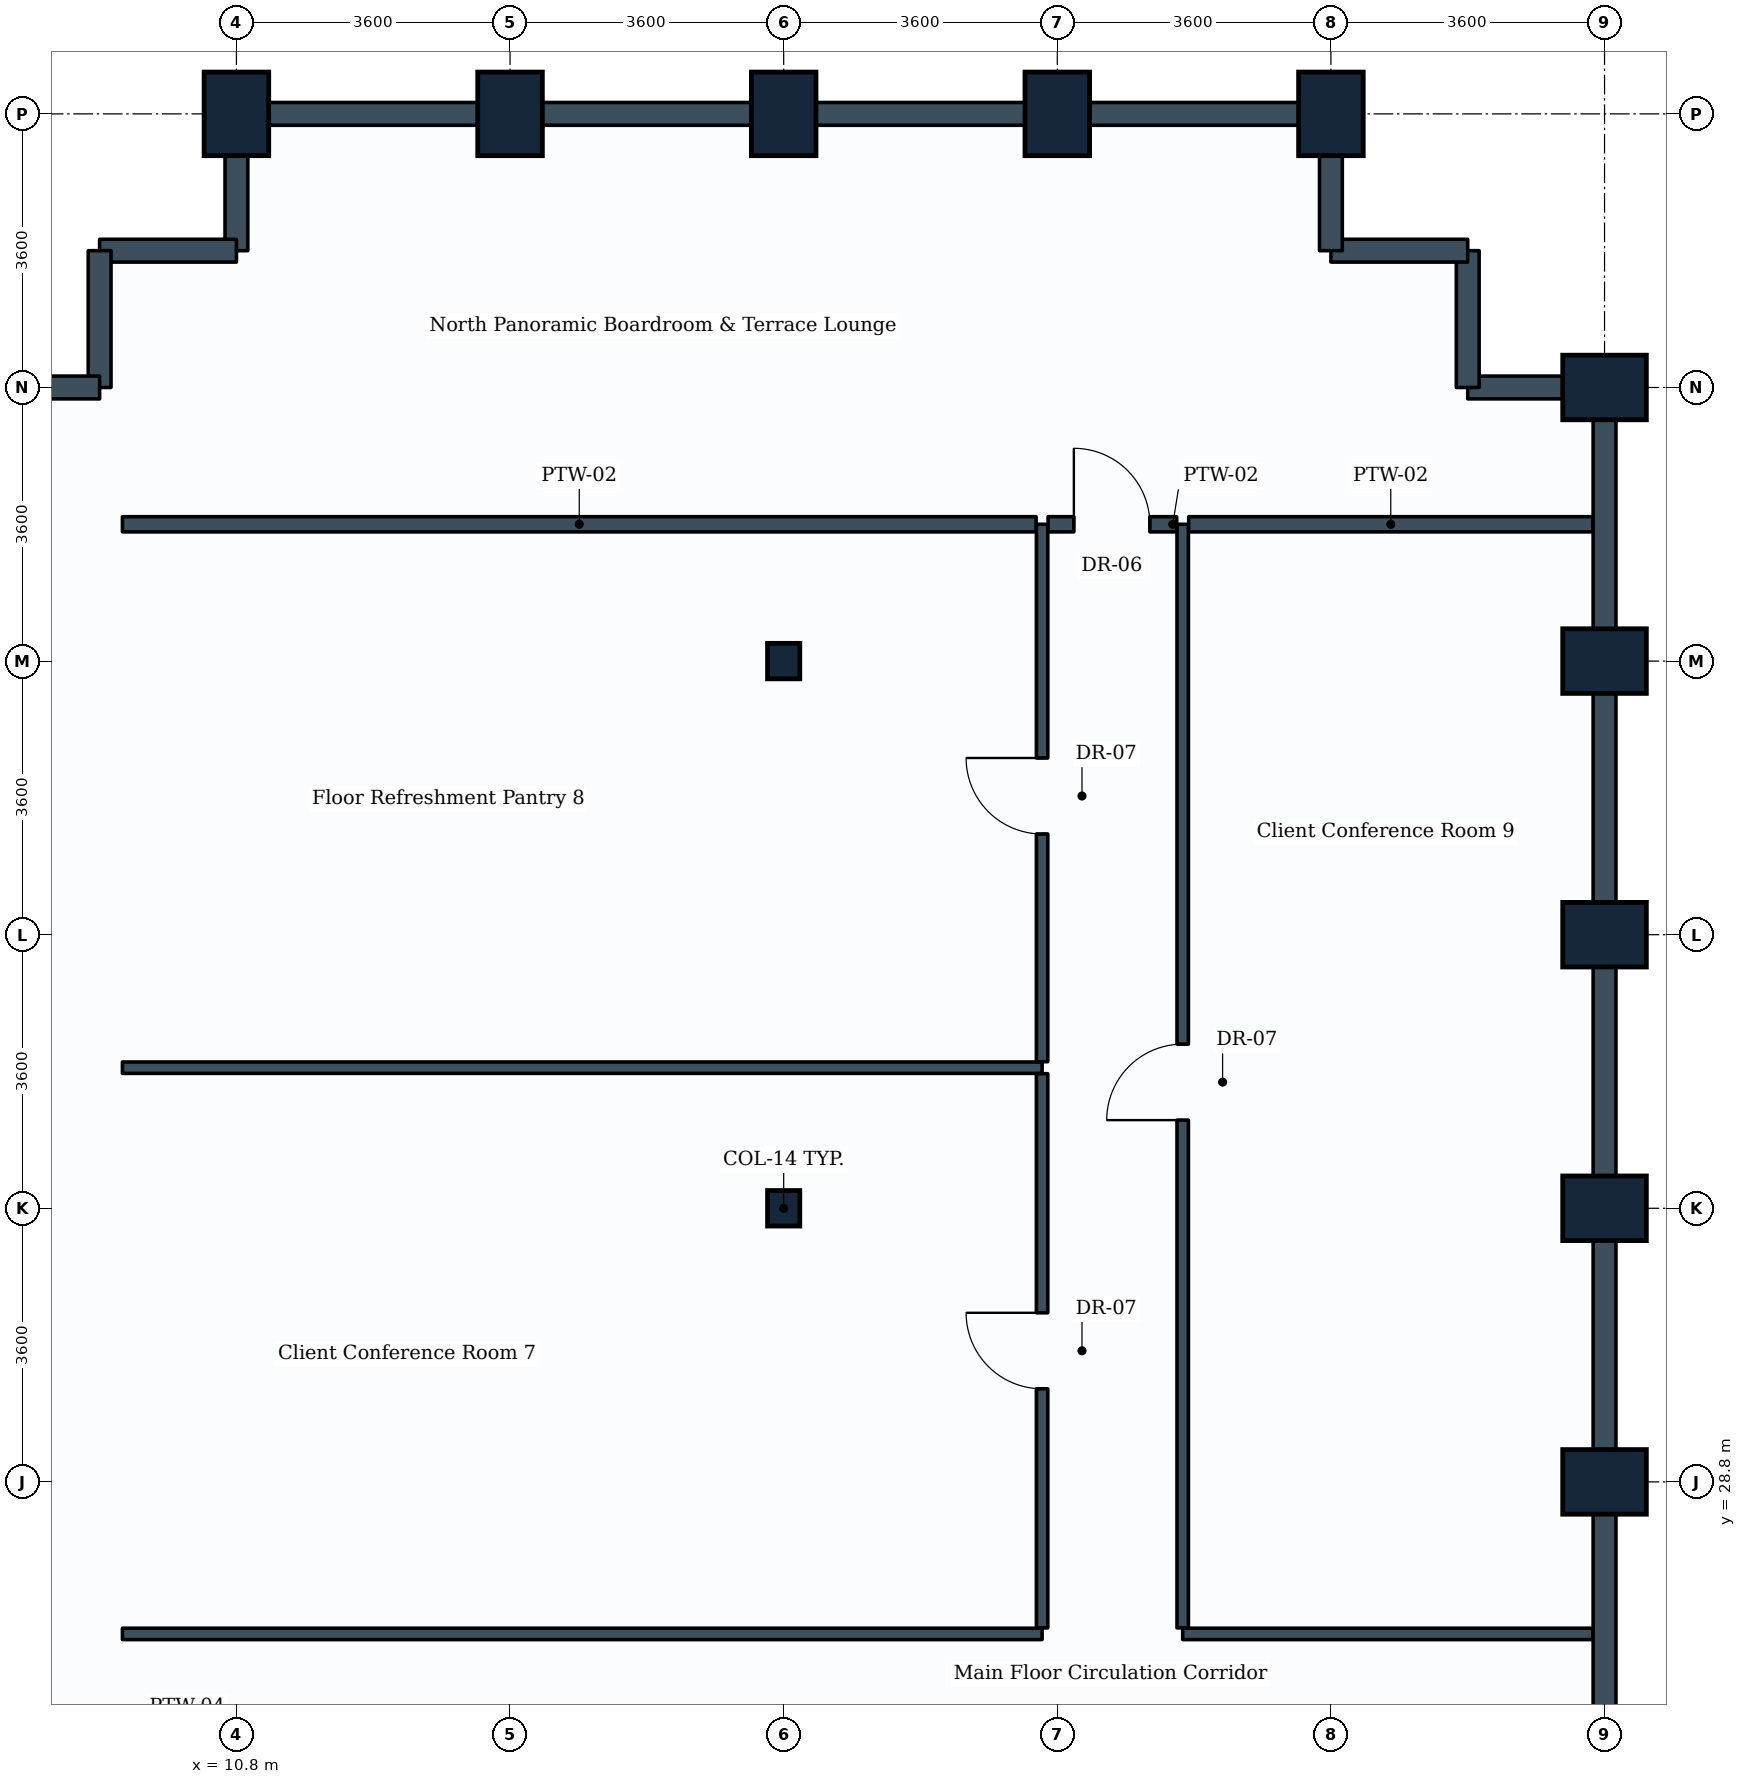
"""IFC4 building model, lengths in metres.
Left out: names, types, materials, properties, quantities, classifications, styles, units other than length and angle.
Written with IfcOpenShell. Run it as: python <this file> out.ifc"""

import sys

from ifc_helpers import new_model, si_unit, direction, frame, frame_2d, origin, origin_2d, place, context, subcontext, project, spatial, rectangle, i_section, extrude, element, fill, save


model = new_model("IFC4")
c1 = context("Model", 3, precision=1e-05, world=origin(), true_north=direction((0.0, 1.0)))
c2 = subcontext(c1, "Body", "Model", "MODEL_VIEW")
j1 = project(units=[si_unit("LENGTHUNIT", "METRE"), si_unit("PLANEANGLEUNIT", "RADIAN")], contexts=[c1])
p1 = place(None, origin())
s1 = spatial("IfcSite", under=j1, at=p1, CompositionType="ELEMENT")
p2 = place(p1, origin())
s2 = spatial("IfcBuilding", under=s1, at=p2, CompositionType="ELEMENT")
p3 = place(p2, frame((0.0, 0.0, 91.8)))
s3 = spatial("IfcBuildingStorey", under=s2, at=p3, CompositionType="ELEMENT", Elevation=91.8)
for number, where, z_axis, x_axis in (
    (1, (10.8, 46.8, 0.0), (0.0, 0.0, 1.0), (1.0, 0.0, 0.0)),
    (2, (14.4, 46.8, 0.0), (0.0, 0.0, 1.0), (1.0, 0.0, 0.0)),
):
    element("IfcColumn", number, at=place(p3, frame(where, z_axis=z_axis, x_axis=x_axis)), inside=s3, PredefinedType="COLUMN", context=c2, shape_type="SweptSolid", body=[
        extrude(rectangle(XDim=0.85, YDim=1.1, at=origin_2d()), origin(), (0.0, 0.0, 1.0), 3.9),
    ])
for number, where, z_axis, x_axis in (
    (3, (18.0, 32.4, 0.0), (0.0, 0.0, 1.0), (1.0, 0.0, 0.0)),
    (4, (18.0, 39.6, 0.0), (0.0, 0.0, 1.0), (1.0, 0.0, 0.0)),
):
    element("IfcColumn", number, at=place(p3, frame(where, z_axis=z_axis, x_axis=x_axis)), inside=s3, PredefinedType="COLUMN", context=c2, shape_type="SweptSolid", body=[
        extrude(i_section(OverallWidth=0.424, OverallDepth=0.467, WebThickness=0.033, FlangeThickness=0.053, FilletRadius=0.015, at=origin_2d()), origin(), (0.0, 0.0, 1.0), 3.9),
    ])
for number, where, z_axis, x_axis in (
    (5, (18.0, 46.8, 0.0), (0.0, 0.0, 1.0), (1.0, 0.0, 0.0)),
    (6, (21.6, 46.8, 0.0), (0.0, 0.0, 1.0), (1.0, 0.0, 0.0)),
    (7, (25.2, 46.8, 0.0), (0.0, 0.0, 1.0), (1.0, 0.0, 0.0)),
    (8, (28.8, 28.8, 0.0), (0.0, 0.0, 1.0), (0.0, 1.0, 0.0)),
    (9, (28.8, 32.4, 0.0), (0.0, 0.0, 1.0), (0.0, 1.0, 0.0)),
    (10, (28.8, 36.0, 0.0), (0.0, 0.0, 1.0), (0.0, 1.0, 0.0)),
    (11, (28.8, 39.6, 0.0), (0.0, 0.0, 1.0), (0.0, 1.0, 0.0)),
    (12, (28.8, 43.2, 0.0), (0.0, 0.0, 1.0), (0.0, 1.0, 0.0)),
):
    element("IfcColumn", number, at=place(p3, frame(where, z_axis=z_axis, x_axis=x_axis)), inside=s3, PredefinedType="COLUMN", context=c2, shape_type="SweptSolid", body=[
        extrude(rectangle(XDim=0.85, YDim=1.1, at=origin_2d()), origin(), (0.0, 0.0, 1.0), 3.9),
    ])
p4 = place(p3, frame((28.8, 28.8, 0.0), z_axis=(0.0, 0.0, 1.0), x_axis=(0.0, -1.0, 0.0)))
e13 = element("IfcWall", 13, at=p4, inside=s3, PredefinedType="STANDARD", context=c2, shape_type="SweptSolid", body=[
    extrude(rectangle(XDim=3.6, YDim=0.3, at=frame_2d((1.8, 0.0))), origin(), (0.0, 0.0, 1.0), 3.19),
])
p5 = place(p3, frame((28.8, 32.4, 0.0), z_axis=(0.0, 0.0, 1.0), x_axis=(0.0, -1.0, 0.0)))
e14 = element("IfcWall", 14, at=p5, inside=s3, PredefinedType="STANDARD", context=c2, shape_type="SweptSolid", body=[
    extrude(rectangle(XDim=3.6, YDim=0.3, at=frame_2d((1.8, 0.0))), origin(), (0.0, 0.0, 1.0), 2.93),
])
for number, where, z_axis, x_axis in (
    (15, (28.8, 36.0, 0.0), (0.0, 0.0, 1.0), (0.0, -1.0, 0.0)),
    (16, (28.8, 39.6, 0.0), (0.0, 0.0, 1.0), (0.0, -1.0, 0.0)),
):
    element("IfcWall", number, at=place(p3, frame(where, z_axis=z_axis, x_axis=x_axis)), inside=s3, PredefinedType="STANDARD", context=c2, shape_type="SweptSolid", body=[
        extrude(rectangle(XDim=3.6, YDim=0.3, at=frame_2d((1.8, 0.0))), origin(), (0.0, 0.0, 1.0), 2.93),
    ])
p6 = place(p3, frame((28.8, 43.2, 0.0), z_axis=(0.0, 0.0, 1.0), x_axis=(0.0, -1.0, 0.0)))
e17 = element("IfcWall", 17, at=p6, inside=s3, PredefinedType="STANDARD", context=c2, shape_type="SweptSolid", body=[
    extrude(rectangle(XDim=3.6, YDim=0.3, at=frame_2d((1.8, 0.0))), origin(), (0.0, 0.0, 1.0), 2.93),
])
p7 = place(p3, frame((27.0, 43.2, 0.0), z_axis=(0.0, 0.0, 1.0), x_axis=(1.0, 0.0, 0.0)))
e18 = element("IfcWall", 18, at=p7, inside=s3, PredefinedType="STANDARD", context=c2, shape_type="SweptSolid", body=[
    extrude(rectangle(XDim=1.8, YDim=0.3, at=frame_2d((0.9, 0.0))), origin(), (0.0, 0.0, 1.0), 2.93),
])
for number, where, z_axis, x_axis in (
    (19, (27.0, 43.2, 0.0), (0.0, 0.0, 1.0), (0.0, 1.0, 0.0)),
    (20, (25.2, 45.0, 0.0), (0.0, 0.0, 1.0), (1.0, 0.0, 0.0)),
):
    element("IfcWall", number, at=place(p3, frame(where, z_axis=z_axis, x_axis=x_axis)), inside=s3, PredefinedType="STANDARD", context=c2, shape_type="SweptSolid", body=[
        extrude(rectangle(XDim=1.8, YDim=0.3, at=frame_2d((0.9, 0.0))), origin(), (0.0, 0.0, 1.0), 3.635),
    ])
p8 = place(p3, frame((25.2, 45.0, 0.0), z_axis=(0.0, 0.0, 1.0), x_axis=(0.0, 1.0, 0.0)))
e21 = element("IfcWall", 21, at=p8, inside=s3, PredefinedType="STANDARD", context=c2, shape_type="SweptSolid", body=[
    extrude(rectangle(XDim=1.8, YDim=0.3, at=frame_2d((0.9, 0.0))), origin(), (0.0, 0.0, 1.0), 2.93),
])
p9 = place(p3, frame((21.6, 46.8, 0.0), z_axis=(0.0, 0.0, 1.0), x_axis=(1.0, 0.0, 0.0)))
e22 = element("IfcWall", 22, at=p9, inside=s3, PredefinedType="STANDARD", context=c2, shape_type="SweptSolid", body=[
    extrude(rectangle(XDim=3.6, YDim=0.3, at=frame_2d((1.8, 0.0))), origin(), (0.0, 0.0, 1.0), 2.93),
])
for number, where, z_axis, x_axis in (
    (23, (18.0, 46.8, 0.0), (0.0, 0.0, 1.0), (1.0, 0.0, 0.0)),
    (24, (14.4, 46.8, 0.0), (0.0, 0.0, 1.0), (1.0, 0.0, 0.0)),
):
    element("IfcWall", number, at=place(p3, frame(where, z_axis=z_axis, x_axis=x_axis)), inside=s3, PredefinedType="STANDARD", context=c2, shape_type="SweptSolid", body=[
        extrude(rectangle(XDim=3.6, YDim=0.3, at=frame_2d((1.8, 0.0))), origin(), (0.0, 0.0, 1.0), 2.93),
    ])
p10 = place(p3, frame((10.8, 46.8, 0.0), z_axis=(0.0, 0.0, 1.0), x_axis=(1.0, 0.0, 0.0)))
e25 = element("IfcWall", 25, at=p10, inside=s3, PredefinedType="STANDARD", context=c2, shape_type="SweptSolid", body=[
    extrude(rectangle(XDim=3.6, YDim=0.3, at=frame_2d((1.8, 0.0))), origin(), (0.0, 0.0, 1.0), 2.93),
])
p11 = place(p3, frame((10.8, 45.0, 0.0), z_axis=(0.0, 0.0, 1.0), x_axis=(0.0, 1.0, 0.0)))
e26 = element("IfcWall", 26, at=p11, inside=s3, PredefinedType="STANDARD", context=c2, shape_type="SweptSolid", body=[
    extrude(rectangle(XDim=1.8, YDim=0.3, at=frame_2d((0.9, 0.0))), origin(), (0.0, 0.0, 1.0), 2.93),
])
for number, where, z_axis, x_axis in (
    (27, (9.0, 45.0, 0.0), (0.0, 0.0, 1.0), (1.0, 0.0, 0.0)),
    (28, (9.0, 43.2, 0.0), (0.0, 0.0, 1.0), (0.0, 1.0, 0.0)),
):
    element("IfcWall", number, at=place(p3, frame(where, z_axis=z_axis, x_axis=x_axis)), inside=s3, PredefinedType="STANDARD", context=c2, shape_type="SweptSolid", body=[
        extrude(rectangle(XDim=1.8, YDim=0.3, at=frame_2d((0.9, 0.0))), origin(), (0.0, 0.0, 1.0), 3.635),
    ])
p12 = place(p3, frame((7.2, 43.2, 0.0), z_axis=(0.0, 0.0, 1.0), x_axis=(1.0, 0.0, 0.0)))
e29 = element("IfcWall", 29, at=p12, inside=s3, PredefinedType="STANDARD", context=c2, shape_type="SweptSolid", body=[
    extrude(rectangle(XDim=1.8, YDim=0.3, at=frame_2d((0.9, 0.0))), origin(), (0.0, 0.0, 1.0), 2.93),
])
for number, where, z_axis, x_axis in (
    (30, (9.3, 26.8, 0.0), (0.0, 0.0, 1.0), (1.0, 0.0, 0.0)),
    (31, (9.3, 34.25, 0.0), (0.0, 0.0, 1.0), (1.0, 0.0, 0.0)),
):
    element("IfcWall", number, at=place(p3, frame(where, z_axis=z_axis, x_axis=x_axis)), inside=s3, PredefinedType="PARTITIONING", context=c2, shape_type="SweptSolid", body=[
        extrude(rectangle(XDim=12.1, YDim=0.15, at=frame_2d((6.05, 0.0))), origin(), (0.0, 0.0, 1.0), 3.18),
    ])
p13 = place(p3, frame((21.4, 26.879, 0.0), z_axis=(0.0, 0.0, 1.0), x_axis=(0.0, 1.0, 0.0)))
e32 = element("IfcWall", 32, at=p13, inside=s3, PredefinedType="PARTITIONING", context=c2, shape_type="SweptSolid", body=[
    extrude(rectangle(XDim=7.292, YDim=0.15, at=frame_2d((3.646, 0.0))), origin(), (0.0, 0.0, 1.0), 3.19),
])
p14 = place(p13, frame((3.146, 0.0, 0.0)))
e33 = element("IfcOpeningElement", 33, at=p14, cuts=e32, PredefinedType="OPENING", context=c2, shape_type="SweptSolid", body=[
    extrude(rectangle(XDim=1.0, YDim=2.1, at=frame_2d((0.5, 1.05))), frame((0.0, 0.085, 0.0), z_axis=(0.0, -1.0, 0.0), x_axis=(1.0, 0.0, 0.0)), (0.0, 0.0, 1.0), 0.17),
])
p15 = place(p3, frame((21.4, 34.329, 0.0), z_axis=(0.0, 0.0, 1.0), x_axis=(0.0, 1.0, 0.0)))
e34 = element("IfcWall", 34, at=p15, inside=s3, PredefinedType="PARTITIONING", context=c2, shape_type="SweptSolid", body=[
    extrude(rectangle(XDim=7.071, YDim=0.15, at=frame_2d((3.535, 0.0))), origin(), (0.0, 0.0, 1.0), 3.18),
])
p16 = place(p15, frame((2.996, 0.0, 0.0)))
e35 = element("IfcOpeningElement", 35, at=p16, cuts=e34, PredefinedType="OPENING", context=c2, shape_type="SweptSolid", body=[
    extrude(rectangle(XDim=1.0, YDim=2.1, at=frame_2d((0.5, 1.05))), frame((0.0, 0.085, 0.0), z_axis=(0.0, -1.0, 0.0), x_axis=(1.0, 0.0, 0.0)), (0.0, 0.0, 1.0), 0.17),
])
p17 = place(p3, frame((23.25, 26.8, 0.0), z_axis=(0.0, 0.0, 1.0), x_axis=(1.0, 0.0, 0.0)))
e36 = element("IfcWall", 36, at=p17, inside=s3, PredefinedType="PARTITIONING", context=c2, shape_type="SweptSolid", body=[
    extrude(rectangle(XDim=5.396, YDim=0.15, at=frame_2d((2.698, 0.0))), origin(), (0.0, 0.0, 1.0), 3.635),
])
p18 = place(p3, frame((23.25, 26.879, 0.0), z_axis=(0.0, 0.0, 1.0), x_axis=(0.0, 1.0, 0.0)))
e37 = element("IfcWall", 37, at=p18, inside=s3, PredefinedType="PARTITIONING", context=c2, shape_type="SweptSolid", body=[
    extrude(rectangle(XDim=14.521, YDim=0.15, at=frame_2d((7.26, 0.0))), origin(), (0.0, 0.0, 1.0), 3.19),
])
p19 = place(p18, frame((6.681, 0.0, 0.0)))
e38 = element("IfcOpeningElement", 38, at=p19, cuts=e37, PredefinedType="OPENING", context=c2, shape_type="SweptSolid", body=[
    extrude(rectangle(XDim=1.0, YDim=2.1, at=frame_2d((0.5, 1.05))), frame((0.0, 0.085, 0.0), z_axis=(0.0, -1.0, 0.0), x_axis=(1.0, 0.0, 0.0)), (0.0, 0.0, 1.0), 0.17),
])
p20 = place(p3, frame((9.3, 41.4, 0.0), z_axis=(0.0, 0.0, 1.0), x_axis=(1.0, 0.0, 0.0)))
e39 = element("IfcWall", 39, at=p20, inside=s3, PredefinedType="PARTITIONING", context=c2, shape_type="SweptSolid", body=[
    extrude(rectangle(XDim=12.021, YDim=0.2, at=frame_2d((6.01, 0.0))), origin(), (0.0, 0.0, 1.0), 3.18),
])
p21 = place(p3, frame((23.329, 41.4, 0.0), z_axis=(0.0, 0.0, 1.0), x_axis=(1.0, 0.0, 0.0)))
e40 = element("IfcWall", 40, at=p21, inside=s3, PredefinedType="PARTITIONING", context=c2, shape_type="SweptSolid", body=[
    extrude(rectangle(XDim=5.317, YDim=0.2, at=frame_2d((2.658, 0.0))), origin(), (0.0, 0.0, 1.0), 2.93),
])
p22 = place(p3, frame((21.479, 41.4, 0.0), z_axis=(0.0, 0.0, 1.0), x_axis=(1.0, 0.0, 0.0)))
e41 = element("IfcWall", 41, at=p22, inside=s3, PredefinedType="PARTITIONING", context=c2, shape_type="SweptSolid", body=[
    extrude(rectangle(XDim=1.692, YDim=0.2, at=frame_2d((0.846, 0.0))), origin(), (0.0, 0.0, 1.0), 3.635),
])
p23 = place(p22, frame((0.339, 0.0, 0.0)))
e42 = element("IfcOpeningElement", 42, at=p23, cuts=e41, PredefinedType="OPENING", context=c2, shape_type="SweptSolid", body=[
    extrude(rectangle(XDim=1.0, YDim=2.1, at=frame_2d((0.5, 1.05))), frame((0.0, 0.11, 0.0), z_axis=(0.0, -1.0, 0.0), x_axis=(1.0, 0.0, 0.0)), (0.0, 0.0, 1.0), 0.22),
])
p24 = place(p14, origin())
e43 = element("IfcDoor", 43, at=p24, inside=s3, OperationType="SINGLE_SWING_RIGHT", PredefinedType="DOOR", context=c2, shape_type="SweptSolid", body=[
    extrude(rectangle(XDim=1.0, YDim=2.1, at=frame_2d((0.5, 1.05))), frame((0.0, 0.025, 0.0), z_axis=(0.0, -1.0, 0.0), x_axis=(1.0, 0.0, 0.0)), (0.0, 0.0, 1.0), 0.05),
])
fill(e33, e43)
p25 = place(p16, origin())
e44 = element("IfcDoor", 44, at=p25, inside=s3, OperationType="SINGLE_SWING_RIGHT", PredefinedType="DOOR", context=c2, shape_type="SweptSolid", body=[
    extrude(rectangle(XDim=1.0, YDim=2.1, at=frame_2d((0.5, 1.05))), frame((0.0, 0.025, 0.0), z_axis=(0.0, -1.0, 0.0), x_axis=(1.0, 0.0, 0.0)), (0.0, 0.0, 1.0), 0.05),
])
fill(e35, e44)
p26 = place(p19, origin())
e45 = element("IfcDoor", 45, at=p26, inside=s3, OperationType="SINGLE_SWING_LEFT", PredefinedType="DOOR", context=c2, shape_type="SweptSolid", body=[
    extrude(rectangle(XDim=1.0, YDim=2.1, at=frame_2d((0.5, 1.05))), frame((0.0, 0.025, 0.0), z_axis=(0.0, -1.0, 0.0), x_axis=(1.0, 0.0, 0.0)), (0.0, 0.0, 1.0), 0.05),
])
fill(e38, e45)
p27 = place(p23, origin())
e46 = element("IfcDoor", 46, at=p27, inside=s3, OperationType="SINGLE_SWING_LEFT", PredefinedType="DOOR", context=c2, shape_type="SweptSolid", body=[
    extrude(rectangle(XDim=1.0, YDim=2.1, at=frame_2d((0.5, 1.05))), frame((0.0, 0.025, 0.0), z_axis=(0.0, -1.0, 0.0), x_axis=(1.0, 0.0, 0.0)), (0.0, 0.0, 1.0), 0.05),
])
fill(e42, e46)
save(model, sys.argv[1])
